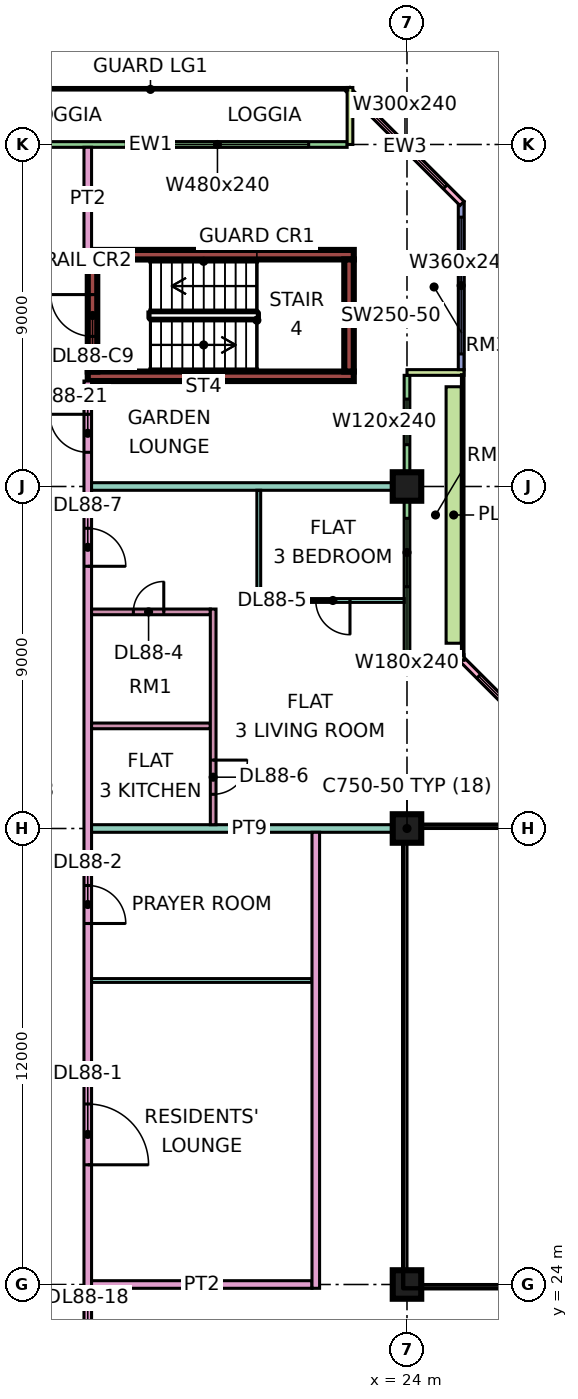
"""IFC4 building model, lengths in metres.
Left out: names, types, materials, properties, quantities, classifications, styles, units other than length and angle.
Written with IfcOpenShell. Run it as: python <this file> out.ifc"""

import sys

from ifc_helpers import new_model, si_unit, direction, frame, frame_2d, origin, origin_2d, place, context, subcontext, project, spatial, rectangle, extrude, element, fill, save


model = new_model("IFC4")
c1 = context("Model", 3, precision=1e-05, world=origin(), true_north=direction((0.0, 1.0)))
c2 = subcontext(c1, "Body", "Model", "MODEL_VIEW")
j1 = project(units=[si_unit("LENGTHUNIT", "METRE"), si_unit("PLANEANGLEUNIT", "RADIAN")], contexts=[c1])
p1 = place(None, origin())
s1 = spatial("IfcSite", under=j1, at=p1, CompositionType="ELEMENT")
p2 = place(p1, origin())
s2 = spatial("IfcBuilding", under=s1, at=p2, CompositionType="ELEMENT")
p3 = place(p2, frame((0.0, 0.0, 376.4)))
s3 = spatial("IfcBuildingStorey", under=s2, at=p3, CompositionType="ELEMENT", Elevation=376.4)
for number, where, z_axis, x_axis in (
    (1, (24.0, 24.0, 0.0), (0.0, 0.0, 1.0), (1.0, 0.0, 0.0)),
    (2, (24.0, 36.0, 0.0), (0.0, 0.0, 1.0), (1.0, 0.0, 0.0)),
    (3, (24.0, 45.0, 0.0), (0.0, 0.0, 1.0), (1.0, 0.0, 0.0)),
):
    element("IfcColumn", number, at=place(p3, frame(where, z_axis=z_axis, x_axis=x_axis)), inside=s3, PredefinedType="COLUMN", context=c2, shape_type="SweptSolid", body=[
        extrude(rectangle(XDim=0.75, YDim=0.75, at=origin_2d()), origin(), (0.0, 0.0, 1.0), 3.75),
    ])
for number, where, z_axis, x_axis in (
    (4, (15.6, 47.9, 0.0), (0.0, 0.0, 1.0), (1.0, 0.0, 0.0)),
    (5, (15.6, 51.1, 0.0), (0.0, 0.0, 1.0), (1.0, 0.0, 0.0)),
):
    element("IfcWall", number, at=place(p3, frame(where, z_axis=z_axis, x_axis=x_axis)), inside=s3, PredefinedType="SHEAR", context=c2, shape_type="SweptSolid", body=[
        extrude(rectangle(XDim=7.0, YDim=0.25, at=frame_2d((3.5, 0.0))), origin(), (0.0, 0.0, 1.0), 3.75),
    ])
p4 = place(p3, frame((15.725, 48.025, 0.0), z_axis=(0.0, 0.0, 1.0), x_axis=(0.0, 1.0, 0.0)))
e6 = element("IfcWall", 6, at=p4, inside=s3, PredefinedType="SHEAR", context=c2, shape_type="SweptSolid", body=[
    extrude(rectangle(XDim=2.95, YDim=0.25, at=frame_2d((1.475, 0.0))), origin(), (0.0, 0.0, 1.0), 3.75),
])
p5 = place(p4, frame((0.925, 0.0, 0.0)))
e7 = element("IfcOpeningElement", 7, at=p5, cuts=e6, PredefinedType="OPENING", context=c2, shape_type="SweptSolid", body=[
    extrude(rectangle(XDim=1.1, YDim=2.2, at=frame_2d((0.55, 1.1))), frame((0.0, 0.135, 0.0), z_axis=(0.0, -1.0, 0.0), x_axis=(1.0, 0.0, 0.0)), (0.0, 0.0, 1.0), 0.27),
])
p6 = place(p3, frame((22.475, 48.025, 0.0), z_axis=(0.0, 0.0, 1.0), x_axis=(0.0, 1.0, 0.0)))
e8 = element("IfcWall", 8, at=p6, inside=s3, PredefinedType="SHEAR", context=c2, shape_type="SweptSolid", body=[
    extrude(rectangle(XDim=2.95, YDim=0.25, at=frame_2d((1.475, 0.0))), origin(), (0.0, 0.0, 1.0), 3.75),
])
p7 = place(p3, frame((28.447, 37.447, 0.0), z_axis=(0.0, 0.0, 1.0), x_axis=(-0.707106781187, 0.707106781187, 0.0)))
e9 = element("IfcWall", 9, at=p7, inside=s3, PredefinedType="SOLIDWALL", context=c2, shape_type="SweptSolid", body=[
    extrude(rectangle(XDim=4.243, YDim=0.15, at=frame_2d((2.121, 0.0))), origin(), (0.0, 0.0, 1.0), 3.35),
])
p8 = place(p7, frame((0.621, 0.0, 0.45)))
e10 = element("IfcOpeningElement", 10, at=p8, cuts=e9, PredefinedType="OPENING", context=c2, shape_type="SweptSolid", body=[
    extrude(rectangle(XDim=3.0, YDim=2.4, at=frame_2d((1.5, 1.2))), frame((0.0, 0.085, 0.0), z_axis=(0.0, -1.0, 0.0), x_axis=(1.0, 0.0, 0.0)), (0.0, 0.0, 1.0), 0.17),
])
p9 = place(p3, frame((24.0, 40.575, 0.0), z_axis=(0.0, 0.0, 1.0), x_axis=(0.0, 1.0, 0.0)))
e11 = element("IfcWall", 11, at=p9, inside=s3, PredefinedType="SOLIDWALL", context=c2, shape_type="SweptSolid", body=[
    extrude(rectangle(XDim=7.35, YDim=0.15, at=frame_2d((3.675, 0.0))), origin(), (0.0, 0.0, 1.0), 3.35),
])
p10 = place(p9, frame((1.788, 0.0, 0.45)))
e12 = element("IfcOpeningElement", 12, at=p10, cuts=e11, PredefinedType="OPENING", context=c2, shape_type="SweptSolid", body=[
    extrude(rectangle(XDim=1.8, YDim=2.4, at=frame_2d((0.9, 1.2))), frame((0.0, 0.085, 0.0), z_axis=(0.0, -1.0, 0.0), x_axis=(1.0, 0.0, 0.0)), (0.0, 0.0, 1.0), 0.17),
])
p11 = place(p9, frame((5.525, 0.0, 0.45)))
e13 = element("IfcOpeningElement", 13, at=p11, cuts=e11, PredefinedType="OPENING", context=c2, shape_type="SweptSolid", body=[
    extrude(rectangle(XDim=1.2, YDim=2.4, at=frame_2d((0.6, 1.2))), frame((0.0, 0.085, 0.0), z_axis=(0.0, -1.0, 0.0), x_axis=(1.0, 0.0, 0.0)), (0.0, 0.0, 1.0), 0.17),
])
for number, where, z_axis, x_axis in (
    (14, (25.5, 40.5, 0.0), (0.0, 0.0, 1.0), (-1.0, 0.0, 0.0)),
    (15, (25.5, 48.0, 0.0), (0.0, 0.0, 1.0), (-1.0, 0.0, 0.0)),
):
    element("IfcWall", number, at=place(p3, frame(where, z_axis=z_axis, x_axis=x_axis)), inside=s3, PredefinedType="SOLIDWALL", context=c2, shape_type="SweptSolid", body=[
        extrude(rectangle(XDim=1.5, YDim=0.15, at=frame_2d((0.75, 0.0))), origin(), (0.0, 0.0, 1.0), 3.35),
    ])
p12 = place(p3, frame((25.425, 48.075, 0.0), z_axis=(0.0, 0.0, 1.0), x_axis=(0.0, 1.0, 0.0)))
e16 = element("IfcWall", 16, at=p12, inside=s3, PredefinedType="SOLIDWALL", context=c2, shape_type="SweptSolid", body=[
    extrude(rectangle(XDim=4.425, YDim=0.15, at=frame_2d((2.212, 0.0))), origin(), (0.0, 0.0, 1.0), 3.35),
])
p13 = place(p12, frame((0.413, 0.0, 0.45)))
e17 = element("IfcOpeningElement", 17, at=p13, cuts=e16, PredefinedType="OPENING", context=c2, shape_type="SweptSolid", body=[
    extrude(rectangle(XDim=3.6, YDim=2.4, at=frame_2d((1.8, 1.2))), frame((0.0, 0.085, 0.0), z_axis=(0.0, -1.0, 0.0), x_axis=(1.0, 0.0, 0.0)), (0.0, 0.0, 1.0), 0.17),
])
p14 = place(p3, frame((25.447, 52.447, 0.0), z_axis=(0.0, 0.0, 1.0), x_axis=(-0.707106781187, 0.707106781187, 0.0)))
e18 = element("IfcWall", 18, at=p14, inside=s3, PredefinedType="SOLIDWALL", context=c2, shape_type="SweptSolid", body=[
    extrude(rectangle(XDim=4.243, YDim=0.15, at=frame_2d((2.121, 0.0))), origin(), (0.0, 0.0, 1.0), 3.35),
])
p15 = place(p14, frame((0.621, 0.0, 0.45)))
e19 = element("IfcOpeningElement", 19, at=p15, cuts=e18, PredefinedType="OPENING", context=c2, shape_type="SweptSolid", body=[
    extrude(rectangle(XDim=3.0, YDim=2.4, at=frame_2d((1.5, 1.2))), frame((0.0, 0.085, 0.0), z_axis=(0.0, -1.0, 0.0), x_axis=(1.0, 0.0, 0.0)), (0.0, 0.0, 1.0), 0.17),
])
p16 = place(p3, frame((22.425, 54.0, 0.0), z_axis=(0.0, 0.0, 1.0), x_axis=(-1.0, 0.0, 0.0)))
e20 = element("IfcWall", 20, at=p16, inside=s3, PredefinedType="SOLIDWALL", context=c2, shape_type="SweptSolid", body=[
    extrude(rectangle(XDim=10.35, YDim=0.15, at=frame_2d((5.175, 0.0))), origin(), (0.0, 0.0, 1.0), 3.35),
])
p17 = place(p16, frame((1.012, 0.0, 0.45)))
e21 = element("IfcOpeningElement", 21, at=p17, cuts=e20, PredefinedType="OPENING", context=c2, shape_type="SweptSolid", body=[
    extrude(rectangle(XDim=4.8, YDim=2.4, at=frame_2d((2.4, 1.2))), frame((0.0, 0.085, 0.0), z_axis=(0.0, -1.0, 0.0), x_axis=(1.0, 0.0, 0.0)), (0.0, 0.0, 1.0), 0.17),
])
p18 = place(p3, frame((22.5, 55.5, 0.0), z_axis=(0.0, 0.0, 1.0), x_axis=(0.0, -1.0, 0.0)))
e22 = element("IfcWall", 22, at=p18, inside=s3, PredefinedType="SOLIDWALL", context=c2, shape_type="SweptSolid", body=[
    extrude(rectangle(XDim=1.5, YDim=0.15, at=frame_2d((0.75, 0.0))), origin(), (0.0, 0.0, 1.0), 3.35),
])
p19 = place(p3, frame((25.229, 40.875, 0.0), z_axis=(0.0, 0.0, 1.0), x_axis=(0.0, 1.0, 0.0)))
e23 = element("IfcWall", 23, at=p19, inside=s3, PredefinedType="SOLIDWALL", context=c2, shape_type="SweptSolid", body=[
    extrude(rectangle(XDim=6.75, YDim=0.4, at=frame_2d((3.375, 0.0))), origin(), (0.0, 0.0, 1.0), 0.7),
])
p20 = place(p3, frame((15.6, 20.0, 0.0), z_axis=(0.0, 0.0, 1.0), x_axis=(0.0, 1.0, 0.0)))
e24 = element("IfcWall", 24, at=p20, inside=s3, PredefinedType="PARTITIONING", context=c2, shape_type="SweptSolid", body=[
    extrude(rectangle(XDim=27.775, YDim=0.2, at=frame_2d((13.887, 0.0))), origin(), (0.0, 0.0, 1.0), 3.35),
])
p21 = place(p20, frame((7.15, 0.0, 0.0)))
e25 = element("IfcOpeningElement", 25, at=p21, cuts=e24, PredefinedType="OPENING", context=c2, shape_type="SweptSolid", body=[
    extrude(rectangle(XDim=1.6, YDim=2.1, at=frame_2d((0.8, 1.05))), frame((0.0, 0.11, 0.0), z_axis=(0.0, -1.0, 0.0), x_axis=(1.0, 0.0, 0.0)), (0.0, 0.0, 1.0), 0.22),
])
p22 = place(p20, frame((13.5, 0.0, 0.0)))
e26 = element("IfcOpeningElement", 26, at=p22, cuts=e24, PredefinedType="OPENING", context=c2, shape_type="SweptSolid", body=[
    extrude(rectangle(XDim=1.0, YDim=2.1, at=frame_2d((0.5, 1.05))), frame((0.0, 0.11, 0.0), z_axis=(0.0, -1.0, 0.0), x_axis=(1.0, 0.0, 0.0)), (0.0, 0.0, 1.0), 0.22),
])
p23 = place(p20, frame((22.9, 0.0, 0.0)))
e27 = element("IfcOpeningElement", 27, at=p23, cuts=e24, PredefinedType="OPENING", context=c2, shape_type="SweptSolid", body=[
    extrude(rectangle(XDim=1.0, YDim=2.1, at=frame_2d((0.5, 1.05))), frame((0.0, 0.11, 0.0), z_axis=(0.0, -1.0, 0.0), x_axis=(1.0, 0.0, 0.0)), (0.0, 0.0, 1.0), 0.22),
])
p24 = place(p20, frame((1.15, 0.0, 0.0)))
e28 = element("IfcOpeningElement", 28, at=p24, cuts=e24, PredefinedType="OPENING", context=c2, shape_type="SweptSolid", body=[
    extrude(rectangle(XDim=1.8, YDim=2.1, at=frame_2d((0.9, 1.05))), frame((0.0, 0.11, 0.0), z_axis=(0.0, -1.0, 0.0), x_axis=(1.0, 0.0, 0.0)), (0.0, 0.0, 1.0), 0.22),
])
p25 = place(p20, frame((25.9, 0.0, 0.0)))
e29 = element("IfcOpeningElement", 29, at=p25, cuts=e24, PredefinedType="OPENING", context=c2, shape_type="SweptSolid", body=[
    extrude(rectangle(XDim=1.0, YDim=2.1, at=frame_2d((0.5, 1.05))), frame((0.0, 0.11, 0.0), z_axis=(0.0, -1.0, 0.0), x_axis=(1.0, 0.0, 0.0)), (0.0, 0.0, 1.0), 0.22),
])
p26 = place(p3, frame((15.6, 51.225, 0.0), z_axis=(0.0, 0.0, 1.0), x_axis=(0.0, 1.0, 0.0)))
e30 = element("IfcWall", 30, at=p26, inside=s3, PredefinedType="PARTITIONING", context=c2, shape_type="SweptSolid", body=[
    extrude(rectangle(XDim=2.701, YDim=0.2, at=frame_2d((1.351, 0.0))), origin(), (0.0, 0.0, 1.0), 3.35),
])
p27 = place(p3, frame((15.7, 24.0, 0.0), z_axis=(0.0, 0.0, 1.0), x_axis=(1.0, 0.0, 0.0)))
e31 = element("IfcWall", 31, at=p27, inside=s3, PredefinedType="PARTITIONING", context=c2, shape_type="SweptSolid", body=[
    extrude(rectangle(XDim=5.8, YDim=0.2, at=frame_2d((2.9, 0.0))), origin(), (0.0, 0.0, 1.0), 3.35),
])
p28 = place(p3, frame((15.7, 32.0, 0.0), z_axis=(0.0, 0.0, 1.0), x_axis=(1.0, 0.0, 0.0)))
e32 = element("IfcWall", 32, at=p28, inside=s3, PredefinedType="PARTITIONING", context=c2, shape_type="SweptSolid", body=[
    extrude(rectangle(XDim=5.8, YDim=0.1, at=frame_2d((2.9, 0.0))), origin(), (0.0, 0.0, 1.0), 3.35),
])
p29 = place(p3, frame((15.7, 36.0, 0.0), z_axis=(0.0, 0.0, 1.0), x_axis=(1.0, 0.0, 0.0)))
e33 = element("IfcWall", 33, at=p29, inside=s3, PredefinedType="PARTITIONING", context=c2, shape_type="SweptSolid", body=[
    extrude(rectangle(XDim=8.3, YDim=0.2, at=frame_2d((4.15, 0.0))), origin(), (0.0, 0.0, 1.0), 3.35),
])
p30 = place(p3, frame((15.7, 38.7, 0.0), z_axis=(0.0, 0.0, 1.0), x_axis=(1.0, 0.0, 0.0)))
e34 = element("IfcWall", 34, at=p30, inside=s3, PredefinedType="PARTITIONING", context=c2, shape_type="SweptSolid", body=[
    extrude(rectangle(XDim=3.125, YDim=0.15, at=frame_2d((1.562, 0.0))), origin(), (0.0, 0.0, 1.0), 3.35),
])
p31 = place(p3, frame((15.7, 41.7, 0.0), z_axis=(0.0, 0.0, 1.0), x_axis=(1.0, 0.0, 0.0)))
e35 = element("IfcWall", 35, at=p31, inside=s3, PredefinedType="PARTITIONING", context=c2, shape_type="SweptSolid", body=[
    extrude(rectangle(XDim=3.125, YDim=0.15, at=frame_2d((1.562, 0.0))), origin(), (0.0, 0.0, 1.0), 3.35),
])
p32 = place(p31, frame((1.1, 0.0, 0.0)))
e36 = element("IfcOpeningElement", 36, at=p32, cuts=e35, PredefinedType="OPENING", context=c2, shape_type="SweptSolid", body=[
    extrude(rectangle(XDim=0.8, YDim=2.1, at=frame_2d((0.4, 1.05))), frame((0.0, 0.085, 0.0), z_axis=(0.0, -1.0, 0.0), x_axis=(1.0, 0.0, 0.0)), (0.0, 0.0, 1.0), 0.17),
])
p33 = place(p3, frame((15.7, 45.0, 0.0), z_axis=(0.0, 0.0, 1.0), x_axis=(1.0, 0.0, 0.0)))
e37 = element("IfcWall", 37, at=p33, inside=s3, PredefinedType="PARTITIONING", context=c2, shape_type="SweptSolid", body=[
    extrude(rectangle(XDim=8.226, YDim=0.2, at=frame_2d((4.113, 0.0))), origin(), (0.0, 0.0, 1.0), 3.35),
])
p34 = place(p3, frame((18.9, 36.1, 0.0), z_axis=(0.0, 0.0, 1.0), x_axis=(0.0, 1.0, 0.0)))
e38 = element("IfcWall", 38, at=p34, inside=s3, PredefinedType="PARTITIONING", context=c2, shape_type="SweptSolid", body=[
    extrude(rectangle(XDim=5.675, YDim=0.15, at=frame_2d((2.837, 0.0))), origin(), (0.0, 0.0, 1.0), 3.35),
])
p35 = place(p34, frame((0.8, 0.0, 0.0)))
e39 = element("IfcOpeningElement", 39, at=p35, cuts=e38, PredefinedType="OPENING", context=c2, shape_type="SweptSolid", body=[
    extrude(rectangle(XDim=0.9, YDim=2.1, at=frame_2d((0.45, 1.05))), frame((0.0, 0.085, 0.0), z_axis=(0.0, -1.0, 0.0), x_axis=(1.0, 0.0, 0.0)), (0.0, 0.0, 1.0), 0.17),
])
p36 = place(p3, frame((20.05, 42.0, 0.0), z_axis=(0.0, 0.0, 1.0), x_axis=(1.0, 0.0, 0.0)))
e40 = element("IfcWall", 40, at=p36, inside=s3, PredefinedType="PARTITIONING", context=c2, shape_type="SweptSolid", body=[
    extrude(rectangle(XDim=3.876, YDim=0.1, at=frame_2d((1.938, 0.0))), origin(), (0.0, 0.0, 1.0), 3.35),
])
p37 = place(p36, frame((1.55, 0.0, 0.0)))
e41 = element("IfcOpeningElement", 41, at=p37, cuts=e40, PredefinedType="OPENING", context=c2, shape_type="SweptSolid", body=[
    extrude(rectangle(XDim=0.9, YDim=2.1, at=frame_2d((0.45, 1.05))), frame((0.0, 0.06, 0.0), z_axis=(0.0, -1.0, 0.0), x_axis=(1.0, 0.0, 0.0)), (0.0, 0.0, 1.0), 0.12),
])
p38 = place(p3, frame((20.1, 42.05, 0.0), z_axis=(0.0, 0.0, 1.0), x_axis=(0.0, 1.0, 0.0)))
e42 = element("IfcWall", 42, at=p38, inside=s3, PredefinedType="PARTITIONING", context=c2, shape_type="SweptSolid", body=[
    extrude(rectangle(XDim=2.85, YDim=0.1, at=frame_2d((1.425, 0.0))), origin(), (0.0, 0.0, 1.0), 3.35),
])
p39 = place(p3, frame((21.6, 23.9, 0.0), z_axis=(0.0, 0.0, 1.0), x_axis=(0.0, 1.0, 0.0)))
e43 = element("IfcWall", 43, at=p39, inside=s3, PredefinedType="PARTITIONING", context=c2, shape_type="SweptSolid", body=[
    extrude(rectangle(XDim=12.0, YDim=0.2, at=frame_2d((6.0, 0.0))), origin(), (0.0, 0.0, 1.0), 3.35),
])
p40 = place(p8, origin())
e44 = element("IfcWindow", 44, at=p40, inside=s3, PartitioningType="SINGLE_PANEL", PredefinedType="WINDOW", context=c2, shape_type="SweptSolid", body=[
    extrude(rectangle(XDim=3.0, YDim=2.4, at=frame_2d((1.5, 1.2))), frame((0.0, 0.03, 0.0), z_axis=(0.0, -1.0, 0.0), x_axis=(1.0, 0.0, 0.0)), (0.0, 0.0, 1.0), 0.06),
])
fill(e10, e44)
p41 = place(p10, origin())
e45 = element("IfcWindow", 45, at=p41, inside=s3, PartitioningType="SINGLE_PANEL", PredefinedType="WINDOW", context=c2, shape_type="SweptSolid", body=[
    extrude(rectangle(XDim=1.8, YDim=2.4, at=frame_2d((0.9, 1.2))), frame((0.0, 0.03, 0.0), z_axis=(0.0, -1.0, 0.0), x_axis=(1.0, 0.0, 0.0)), (0.0, 0.0, 1.0), 0.06),
])
fill(e12, e45)
p42 = place(p11, origin())
e46 = element("IfcWindow", 46, at=p42, inside=s3, PartitioningType="SINGLE_PANEL", PredefinedType="WINDOW", context=c2, shape_type="SweptSolid", body=[
    extrude(rectangle(XDim=1.2, YDim=2.4, at=frame_2d((0.6, 1.2))), frame((0.0, 0.03, 0.0), z_axis=(0.0, -1.0, 0.0), x_axis=(1.0, 0.0, 0.0)), (0.0, 0.0, 1.0), 0.06),
])
fill(e13, e46)
p43 = place(p13, origin())
e47 = element("IfcWindow", 47, at=p43, inside=s3, PartitioningType="SINGLE_PANEL", PredefinedType="WINDOW", context=c2, shape_type="SweptSolid", body=[
    extrude(rectangle(XDim=3.6, YDim=2.4, at=frame_2d((1.8, 1.2))), frame((0.0, 0.03, 0.0), z_axis=(0.0, -1.0, 0.0), x_axis=(1.0, 0.0, 0.0)), (0.0, 0.0, 1.0), 0.06),
])
fill(e17, e47)
p44 = place(p15, origin())
e48 = element("IfcWindow", 48, at=p44, inside=s3, PartitioningType="SINGLE_PANEL", PredefinedType="WINDOW", context=c2, shape_type="SweptSolid", body=[
    extrude(rectangle(XDim=3.0, YDim=2.4, at=frame_2d((1.5, 1.2))), frame((0.0, 0.03, 0.0), z_axis=(0.0, -1.0, 0.0), x_axis=(1.0, 0.0, 0.0)), (0.0, 0.0, 1.0), 0.06),
])
fill(e19, e48)
p45 = place(p17, origin())
e49 = element("IfcWindow", 49, at=p45, inside=s3, PartitioningType="SINGLE_PANEL", PredefinedType="WINDOW", context=c2, shape_type="SweptSolid", body=[
    extrude(rectangle(XDim=4.8, YDim=2.4, at=frame_2d((2.4, 1.2))), frame((0.0, 0.03, 0.0), z_axis=(0.0, -1.0, 0.0), x_axis=(1.0, 0.0, 0.0)), (0.0, 0.0, 1.0), 0.06),
])
fill(e21, e49)
p46 = place(p5, frame((1.1, 0.0, 0.0), z_axis=(0.0, 0.0, 1.0), x_axis=(-1.0, 0.0, 0.0)))
e50 = element("IfcDoor", 50, at=p46, inside=s3, OperationType="SINGLE_SWING_RIGHT", PredefinedType="DOOR", context=c2, shape_type="SweptSolid", body=[
    extrude(rectangle(XDim=1.1, YDim=2.2, at=frame_2d((0.55, 1.1))), frame((0.0, 0.025, 0.0), z_axis=(0.0, -1.0, 0.0), x_axis=(1.0, 0.0, 0.0)), (0.0, 0.0, 1.0), 0.05),
])
fill(e7, e50)
p47 = place(p21, frame((1.6, 0.0, 0.0), z_axis=(0.0, 0.0, 1.0), x_axis=(-1.0, 0.0, 0.0)))
e51 = element("IfcDoor", 51, at=p47, inside=s3, OperationType="DOUBLE_DOOR_SINGLE_SWING", PredefinedType="DOOR", context=c2, shape_type="SweptSolid", body=[
    extrude(rectangle(XDim=1.6, YDim=2.1, at=frame_2d((0.8, 1.05))), frame((0.0, 0.025, 0.0), z_axis=(0.0, -1.0, 0.0), x_axis=(1.0, 0.0, 0.0)), (0.0, 0.0, 1.0), 0.05),
])
fill(e25, e51)
p48 = place(p22, frame((1.0, 0.0, 0.0), z_axis=(0.0, 0.0, 1.0), x_axis=(-1.0, 0.0, 0.0)))
e52 = element("IfcDoor", 52, at=p48, inside=s3, OperationType="SINGLE_SWING_LEFT", PredefinedType="DOOR", context=c2, shape_type="SweptSolid", body=[
    extrude(rectangle(XDim=1.0, YDim=2.1, at=frame_2d((0.5, 1.05))), frame((0.0, 0.025, 0.0), z_axis=(0.0, -1.0, 0.0), x_axis=(1.0, 0.0, 0.0)), (0.0, 0.0, 1.0), 0.05),
])
fill(e26, e52)
p49 = place(p32, frame((0.8, 0.0, 0.0), z_axis=(0.0, 0.0, 1.0), x_axis=(-1.0, 0.0, 0.0)))
e53 = element("IfcDoor", 53, at=p49, inside=s3, OperationType="SINGLE_SWING_RIGHT", PredefinedType="DOOR", context=c2, shape_type="SweptSolid", body=[
    extrude(rectangle(XDim=0.8, YDim=2.1, at=frame_2d((0.4, 1.05))), frame((0.0, 0.025, 0.0), z_axis=(0.0, -1.0, 0.0), x_axis=(1.0, 0.0, 0.0)), (0.0, 0.0, 1.0), 0.05),
])
fill(e36, e53)
p50 = place(p37, origin())
e54 = element("IfcDoor", 54, at=p50, inside=s3, OperationType="SINGLE_SWING_RIGHT", PredefinedType="DOOR", context=c2, shape_type="SweptSolid", body=[
    extrude(rectangle(XDim=0.9, YDim=2.1, at=frame_2d((0.45, 1.05))), frame((0.0, 0.025, 0.0), z_axis=(0.0, -1.0, 0.0), x_axis=(1.0, 0.0, 0.0)), (0.0, 0.0, 1.0), 0.05),
])
fill(e41, e54)
p51 = place(p35, origin())
e55 = element("IfcDoor", 55, at=p51, inside=s3, OperationType="SINGLE_SWING_RIGHT", PredefinedType="DOOR", context=c2, shape_type="SweptSolid", body=[
    extrude(rectangle(XDim=0.9, YDim=2.1, at=frame_2d((0.45, 1.05))), frame((0.0, 0.025, 0.0), z_axis=(0.0, -1.0, 0.0), x_axis=(1.0, 0.0, 0.0)), (0.0, 0.0, 1.0), 0.05),
])
fill(e39, e55)
p52 = place(p23, frame((1.0, 0.0, 0.0), z_axis=(0.0, 0.0, 1.0), x_axis=(-1.0, 0.0, 0.0)))
e56 = element("IfcDoor", 56, at=p52, inside=s3, OperationType="SINGLE_SWING_LEFT", PredefinedType="DOOR", context=c2, shape_type="SweptSolid", body=[
    extrude(rectangle(XDim=1.0, YDim=2.1, at=frame_2d((0.5, 1.05))), frame((0.0, 0.025, 0.0), z_axis=(0.0, -1.0, 0.0), x_axis=(1.0, 0.0, 0.0)), (0.0, 0.0, 1.0), 0.05),
])
fill(e27, e56)
p53 = place(p25, frame((1.0, 0.0, 0.0), z_axis=(0.0, 0.0, 1.0), x_axis=(-1.0, 0.0, 0.0)))
e57 = element("IfcDoor", 57, at=p53, inside=s3, OperationType="SINGLE_SWING_RIGHT", PredefinedType="DOOR", context=c2, shape_type="SweptSolid", body=[
    extrude(rectangle(XDim=1.0, YDim=2.1, at=frame_2d((0.5, 1.05))), frame((0.0, 0.025, 0.0), z_axis=(0.0, -1.0, 0.0), x_axis=(1.0, 0.0, 0.0)), (0.0, 0.0, 1.0), 0.05),
])
fill(e29, e57)
save(model, sys.argv[1])
